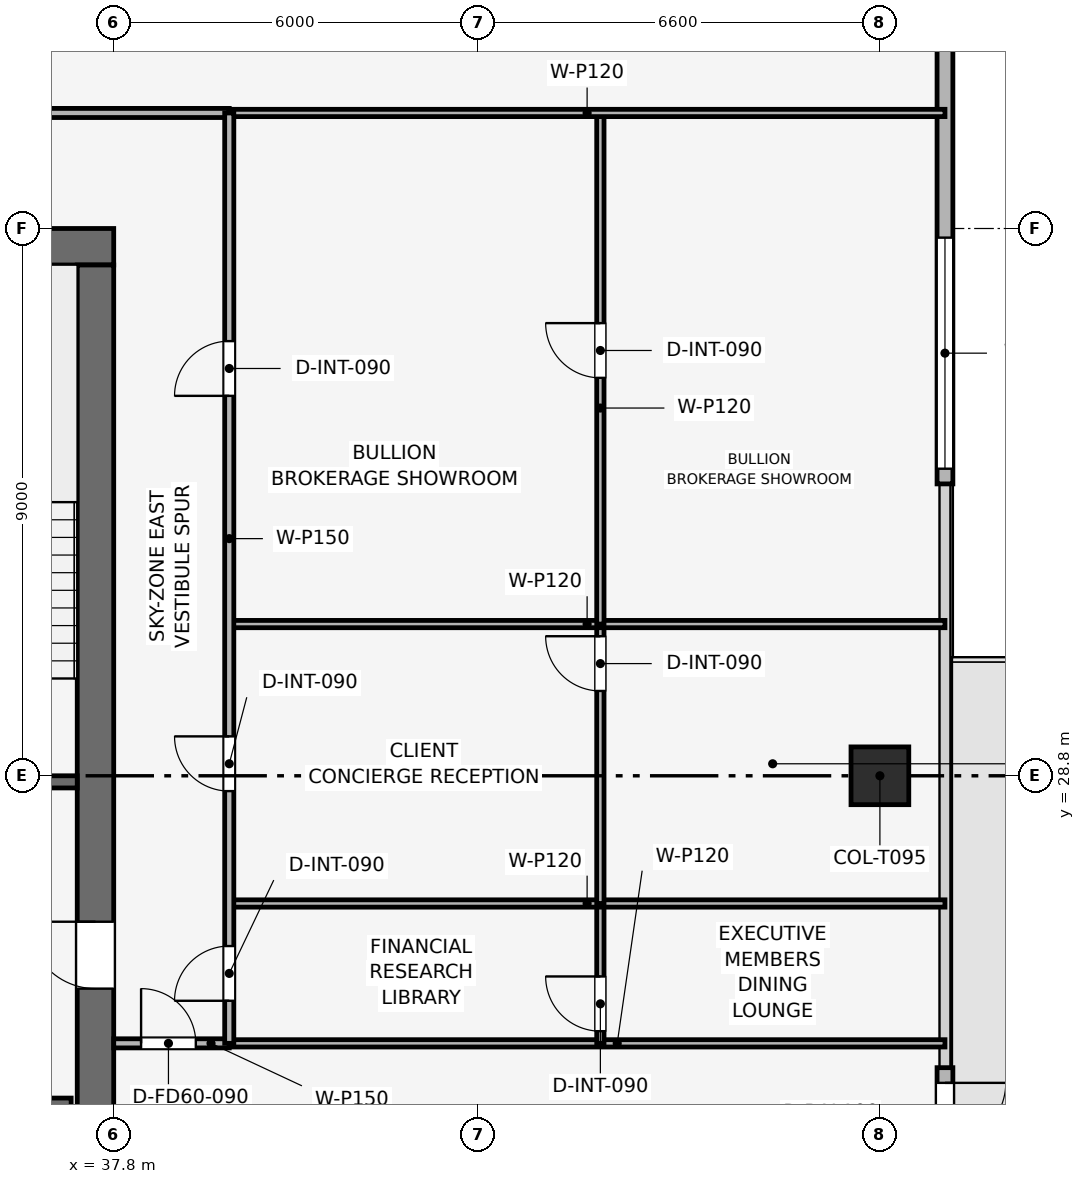
"""IFC4 building model, lengths in metres.
Left out: names, types, materials, properties, quantities, classifications, styles, units other than length and angle.
Written with IfcOpenShell. Run it as: python <this file> out.ifc"""

import sys

from ifc_helpers import new_model, si_unit, direction, frame, frame_2d, origin, origin_2d, place, context, subcontext, project, spatial, rectangle, extrude, element, fill, save


model = new_model("IFC4")
c1 = context("Model", 3, precision=1e-05, world=origin(), true_north=direction((0.0, 1.0)))
c2 = subcontext(c1, "Body", "Model", "MODEL_VIEW")
j1 = project(units=[si_unit("LENGTHUNIT", "METRE"), si_unit("PLANEANGLEUNIT", "RADIAN")], contexts=[c1])
p1 = place(None, origin())
s1 = spatial("IfcSite", under=j1, at=p1, CompositionType="ELEMENT")
p2 = place(p1, origin())
s2 = spatial("IfcBuilding", under=s1, at=p2, CompositionType="ELEMENT")
p3 = place(p2, frame((0.0, 0.0, 303.0)))
s3 = spatial("IfcBuildingStorey", under=s2, at=p3, CompositionType="ELEMENT", Elevation=303.0)
p4 = place(p3, frame((19.8, 37.5, 0.0), z_axis=(0.0, 0.0, 1.0), x_axis=(1.0, 0.0, 0.0)))
e1 = element("IfcWall", 1, at=p4, inside=s3, PredefinedType="SHEAR", context=c2, shape_type="SweptSolid", body=[
    extrude(rectangle(XDim=18.0, YDim=0.6, at=frame_2d((9.0, 0.0))), origin(), (0.0, 0.0, 1.0), 3.75),
])
p5 = place(p4, frame((7.05, 0.0, 0.0)))
e2 = element("IfcOpeningElement", 2, at=p5, cuts=e1, PredefinedType="OPENING", context=c2, shape_type="SweptSolid", body=[
    extrude(rectangle(XDim=1.1, YDim=2.15, at=frame_2d((0.55, 1.075))), frame((0.0, 0.31, 0.0), z_axis=(0.0, -1.0, 0.0), x_axis=(1.0, 0.0, 0.0)), (0.0, 0.0, 1.0), 0.62),
])
p6 = place(p3, frame((37.5, 20.4, 0.0), z_axis=(0.0, 0.0, 1.0), x_axis=(0.0, 1.0, 0.0)))
e3 = element("IfcWall", 3, at=p6, inside=s3, PredefinedType="SHEAR", context=c2, shape_type="SweptSolid", body=[
    extrude(rectangle(XDim=16.8, YDim=0.6, at=frame_2d((8.4, 0.0))), origin(), (0.0, 0.0, 1.0), 3.75),
])
p7 = place(p6, frame((4.9, 0.0, 0.0)))
e4 = element("IfcOpeningElement", 4, at=p7, cuts=e3, PredefinedType="OPENING", context=c2, shape_type="SweptSolid", body=[
    extrude(rectangle(XDim=1.1, YDim=2.15, at=frame_2d((0.55, 1.075))), frame((0.0, 0.31, 0.0), z_axis=(0.0, -1.0, 0.0), x_axis=(1.0, 0.0, 0.0)), (0.0, 0.0, 1.0), 0.62),
])
p8 = place(p3, frame((50.4, 28.8, 0.003), z_axis=(0.0, 0.0, 1.0), x_axis=(1.0, 0.0, 0.0)))
e5 = element("IfcColumn", 5, at=p8, inside=s3, PredefinedType="COLUMN", context=c2, shape_type="SweptSolid", body=[
    extrude(rectangle(XDim=0.95, YDim=0.95, at=origin_2d()), origin(), (0.0, 0.0, 1.0), 3.504),
])
p9 = place(p3, frame((51.47, 45.3, 0.0), z_axis=(0.0, 0.0, 1.0), x_axis=(0.0, -1.0, 0.0)))
e6 = element("IfcWall", 6, at=p9, inside=s3, PredefinedType="SOLIDWALL", context=c2, shape_type="SweptSolid", body=[
    extrude(rectangle(XDim=11.7, YDim=0.26, at=frame_2d((5.85, 0.0))), origin(), (0.0, 0.0, 1.0), 3.51),
])
p10 = place(p9, frame((7.65, 0.0, 0.9)))
e7 = element("IfcOpeningElement", 7, at=p10, cuts=e6, PredefinedType="OPENING", context=c2, shape_type="SweptSolid", body=[
    extrude(rectangle(XDim=3.8, YDim=1.9, at=frame_2d((1.9, 0.95))), frame((0.0, 0.14, 0.0), z_axis=(0.0, -1.0, 0.0), x_axis=(1.0, 0.0, 0.0)), (0.0, 0.0, 1.0), 0.28),
])
p11 = place(p3, frame((51.47, 24.0, 0.0), z_axis=(0.0, 0.0, 1.0), x_axis=(0.0, -1.0, 0.0)))
e8 = element("IfcWall", 8, at=p11, inside=s3, PredefinedType="SOLIDWALL", context=c2, shape_type="SweptSolid", body=[
    extrude(rectangle(XDim=11.7, YDim=0.26, at=frame_2d((5.85, 0.0))), origin(), (0.0, 0.0, 1.0), 3.51),
])
p12 = place(p11, frame((0.25, 0.0, 0.0)))
e9 = element("IfcOpeningElement", 9, at=p12, cuts=e8, PredefinedType="OPENING", context=c2, shape_type="SweptSolid", body=[
    extrude(rectangle(XDim=1.0, YDim=2.2, at=frame_2d((0.5, 1.1))), frame((0.0, 0.14, 0.0), z_axis=(0.0, -1.0, 0.0), x_axis=(1.0, 0.0, 0.0)), (0.0, 0.0, 1.0), 0.28),
])
p13 = place(p3, frame((34.05, 28.7, 0.0), z_axis=(0.0, 0.0, 1.0), x_axis=(1.0, 0.0, 0.0)))
e10 = element("IfcWall", 10, at=p13, inside=s3, PredefinedType="SHEAR", context=c2, shape_type="SweptSolid", body=[
    extrude(rectangle(XDim=3.15, YDim=0.2, at=frame_2d((1.575, 0.0))), origin(), (0.0, 0.0, 1.0), 3.51),
])
p14 = place(p13, frame((0.8, 0.0, 0.0)))
e11 = element("IfcOpeningElement", 11, at=p14, cuts=e10, PredefinedType="OPENING", context=c2, shape_type="SweptSolid", body=[
    extrude(rectangle(XDim=1.0, YDim=2.1, at=frame_2d((0.5, 1.05))), frame((0.0, 0.11, 0.0), z_axis=(0.0, -1.0, 0.0), x_axis=(1.0, 0.0, 0.0)), (0.0, 0.0, 1.0), 0.22),
])
p15 = place(p3, frame((34.05, 23.4, 0.0), z_axis=(0.0, 0.0, 1.0), x_axis=(1.0, 0.0, 0.0)))
e12 = element("IfcWall", 12, at=p15, inside=s3, PredefinedType="SHEAR", context=c2, shape_type="SweptSolid", body=[
    extrude(rectangle(XDim=3.05, YDim=0.2, at=frame_2d((1.525, 0.0))), origin(), (0.0, 0.0, 1.0), 3.51),
])
p16 = place(p15, frame((1.2, 0.0, 0.0)))
e13 = element("IfcOpeningElement", 13, at=p16, cuts=e12, PredefinedType="OPENING", context=c2, shape_type="SweptSolid", body=[
    extrude(rectangle(XDim=1.1, YDim=2.15, at=frame_2d((0.55, 1.075))), frame((0.0, 0.11, 0.0), z_axis=(0.0, -1.0, 0.0), x_axis=(1.0, 0.0, 0.0)), (0.0, 0.0, 1.0), 0.22),
])
p17 = place(p3, frame((37.8, 24.4, 0.0), z_axis=(0.0, 0.0, 1.0), x_axis=(1.0, 0.0, 0.0)))
e14 = element("IfcWall", 14, at=p17, inside=s3, PredefinedType="PARTITIONING", context=c2, shape_type="SweptSolid", body=[
    extrude(rectangle(XDim=1.9, YDim=0.15, at=frame_2d((0.95, 0.0))), origin(), (0.0, 0.0, 1.0), 3.51),
])
p18 = place(p17, frame((0.45, 0.0, 0.0)))
e15 = element("IfcOpeningElement", 15, at=p18, cuts=e14, PredefinedType="OPENING", context=c2, shape_type="SweptSolid", body=[
    extrude(rectangle(XDim=0.9, YDim=2.1, at=frame_2d((0.45, 1.05))), frame((0.0, 0.085, 0.0), z_axis=(0.0, -1.0, 0.0), x_axis=(1.0, 0.0, 0.0)), (0.0, 0.0, 1.0), 0.17),
])
p19 = place(p3, frame((39.7, 24.4, 0.0), z_axis=(0.0, 0.0, 1.0), x_axis=(1.0, 0.0, 0.0)))
e16 = element("IfcWall", 16, at=p19, inside=s3, PredefinedType="PARTITIONING", context=c2, shape_type="SweptSolid", body=[
    extrude(rectangle(XDim=11.77, YDim=0.12, at=frame_2d((5.885, 0.0))), origin(), (0.0, 0.0, 1.0), 3.135),
])
p20 = place(p3, frame((45.803, 24.4, 0.0), z_axis=(0.0, 0.0, 1.0), x_axis=(0.0, 1.0, 0.0)))
e17 = element("IfcWall", 17, at=p20, inside=s3, PredefinedType="PARTITIONING", context=c2, shape_type="SweptSolid", body=[
    extrude(rectangle(XDim=2.3, YDim=0.12, at=frame_2d((1.15, 0.0))), origin(), (0.0, 0.0, 1.0), 3.51),
])
p21 = place(p20, frame((0.2, 0.0, 0.0)))
e18 = element("IfcOpeningElement", 18, at=p21, cuts=e17, PredefinedType="OPENING", context=c2, shape_type="SweptSolid", body=[
    extrude(rectangle(XDim=0.9, YDim=2.1, at=frame_2d((0.45, 1.05))), frame((0.0, 0.07, 0.0), z_axis=(0.0, -1.0, 0.0), x_axis=(1.0, 0.0, 0.0)), (0.0, 0.0, 1.0), 0.14),
])
p22 = place(p3, frame((39.7, 26.7, 0.0), z_axis=(0.0, 0.0, 1.0), x_axis=(1.0, 0.0, 0.0)))
e19 = element("IfcWall", 19, at=p22, inside=s3, PredefinedType="PARTITIONING", context=c2, shape_type="SweptSolid", body=[
    extrude(rectangle(XDim=11.77, YDim=0.12, at=frame_2d((5.885, 0.0))), origin(), (0.0, 0.0, 1.0), 3.135),
])
p23 = place(p3, frame((45.803, 26.7, 0.0), z_axis=(0.0, 0.0, 1.0), x_axis=(0.0, 1.0, 0.0)))
e20 = element("IfcWall", 20, at=p23, inside=s3, PredefinedType="PARTITIONING", context=c2, shape_type="SweptSolid", body=[
    extrude(rectangle(XDim=4.595, YDim=0.12, at=frame_2d((2.297, 0.0))), origin(), (0.0, 0.0, 1.0), 3.095),
])
p24 = place(p23, frame((3.495, 0.0, 0.0)))
e21 = element("IfcOpeningElement", 21, at=p24, cuts=e20, PredefinedType="OPENING", context=c2, shape_type="SweptSolid", body=[
    extrude(rectangle(XDim=0.9, YDim=2.1, at=frame_2d((0.45, 1.05))), frame((0.0, 0.07, 0.0), z_axis=(0.0, -1.0, 0.0), x_axis=(1.0, 0.0, 0.0)), (0.0, 0.0, 1.0), 0.14),
])
p25 = place(p3, frame((39.7, 31.295, 0.0), z_axis=(0.0, 0.0, 1.0), x_axis=(1.0, 0.0, 0.0)))
e22 = element("IfcWall", 22, at=p25, inside=s3, PredefinedType="PARTITIONING", context=c2, shape_type="SweptSolid", body=[
    extrude(rectangle(XDim=11.77, YDim=0.12, at=frame_2d((5.885, 0.0))), origin(), (0.0, 0.0, 1.0), 3.135),
])
p26 = place(p3, frame((45.803, 31.295, 0.0), z_axis=(0.0, 0.0, 1.0), x_axis=(0.0, 1.0, 0.0)))
e23 = element("IfcWall", 23, at=p26, inside=s3, PredefinedType="PARTITIONING", context=c2, shape_type="SweptSolid", body=[
    extrude(rectangle(XDim=8.405, YDim=0.12, at=frame_2d((4.203, 0.0))), origin(), (0.0, 0.0, 1.0), 3.095),
])
p27 = place(p26, frame((4.049, 0.0, 0.0)))
e24 = element("IfcOpeningElement", 24, at=p27, cuts=e23, PredefinedType="OPENING", context=c2, shape_type="SweptSolid", body=[
    extrude(rectangle(XDim=0.9, YDim=2.1, at=frame_2d((0.45, 1.05))), frame((0.0, 0.07, 0.0), z_axis=(0.0, -1.0, 0.0), x_axis=(1.0, 0.0, 0.0)), (0.0, 0.0, 1.0), 0.14),
])
p28 = place(p3, frame((39.7, 39.7, 0.0), z_axis=(0.0, 0.0, 1.0), x_axis=(1.0, 0.0, 0.0)))
e25 = element("IfcWall", 25, at=p28, inside=s3, PredefinedType="PARTITIONING", context=c2, shape_type="SweptSolid", body=[
    extrude(rectangle(XDim=11.77, YDim=0.12, at=frame_2d((5.885, 0.0))), origin(), (0.0, 0.0, 1.0), 3.095),
])
p29 = place(p3, frame((17.9, 39.7, 0.0), z_axis=(0.0, 0.0, 1.0), x_axis=(1.0, 0.0, 0.0)))
e26 = element("IfcWall", 26, at=p29, inside=s3, PredefinedType="PARTITIONING", context=c2, shape_type="SweptSolid", body=[
    extrude(rectangle(XDim=21.8, YDim=0.15, at=frame_2d((10.9, 0.0))), origin(), (0.0, 0.0, 1.0), 3.095),
])
p30 = place(p29, frame((2.1, 0.0, 0.0)))
e27 = element("IfcOpeningElement", 27, at=p30, cuts=e26, PredefinedType="OPENING", context=c2, shape_type="SweptSolid", body=[
    extrude(rectangle(XDim=0.9, YDim=2.1, at=frame_2d((0.45, 1.05))), frame((0.0, 0.085, 0.0), z_axis=(0.0, -1.0, 0.0), x_axis=(1.0, 0.0, 0.0)), (0.0, 0.0, 1.0), 0.17),
])
p31 = place(p29, frame((6.05, 0.0, 0.0)))
e28 = element("IfcOpeningElement", 28, at=p31, cuts=e26, PredefinedType="OPENING", context=c2, shape_type="SweptSolid", body=[
    extrude(rectangle(XDim=0.9, YDim=2.1, at=frame_2d((0.45, 1.05))), frame((0.0, 0.085, 0.0), z_axis=(0.0, -1.0, 0.0), x_axis=(1.0, 0.0, 0.0)), (0.0, 0.0, 1.0), 0.17),
])
p32 = place(p29, frame((8.95, 0.0, 0.0)))
e29 = element("IfcOpeningElement", 29, at=p32, cuts=e26, PredefinedType="OPENING", context=c2, shape_type="SweptSolid", body=[
    extrude(rectangle(XDim=0.9, YDim=2.1, at=frame_2d((0.45, 1.05))), frame((0.0, 0.085, 0.0), z_axis=(0.0, -1.0, 0.0), x_axis=(1.0, 0.0, 0.0)), (0.0, 0.0, 1.0), 0.17),
])
p33 = place(p29, frame((11.7, 0.0, 0.0)))
e30 = element("IfcOpeningElement", 30, at=p33, cuts=e26, PredefinedType="OPENING", context=c2, shape_type="SweptSolid", body=[
    extrude(rectangle(XDim=0.95, YDim=2.1, at=frame_2d((0.475, 1.05))), frame((0.0, 0.085, 0.0), z_axis=(0.0, -1.0, 0.0), x_axis=(1.0, 0.0, 0.0)), (0.0, 0.0, 1.0), 0.17),
])
p34 = place(p29, frame((17.2, 0.0, 0.0)))
e31 = element("IfcOpeningElement", 31, at=p34, cuts=e26, PredefinedType="OPENING", context=c2, shape_type="SweptSolid", body=[
    extrude(rectangle(XDim=0.9, YDim=2.1, at=frame_2d((0.45, 1.05))), frame((0.0, 0.085, 0.0), z_axis=(0.0, -1.0, 0.0), x_axis=(1.0, 0.0, 0.0)), (0.0, 0.0, 1.0), 0.17),
])
p35 = place(p3, frame((39.7, 24.4, 0.0), z_axis=(0.0, 0.0, 1.0), x_axis=(0.0, 1.0, 0.0)))
e32 = element("IfcWall", 32, at=p35, inside=s3, PredefinedType="PARTITIONING", context=c2, shape_type="SweptSolid", body=[
    extrude(rectangle(XDim=15.3, YDim=0.15, at=frame_2d((7.65, 0.0))), origin(), (0.0, 0.0, 1.0), 3.095),
])
p36 = place(p35, frame((0.7, 0.0, 0.0)))
e33 = element("IfcOpeningElement", 33, at=p36, cuts=e32, PredefinedType="OPENING", context=c2, shape_type="SweptSolid", body=[
    extrude(rectangle(XDim=0.9, YDim=2.1, at=frame_2d((0.45, 1.05))), frame((0.0, 0.085, 0.0), z_axis=(0.0, -1.0, 0.0), x_axis=(1.0, 0.0, 0.0)), (0.0, 0.0, 1.0), 0.17),
])
p37 = place(p35, frame((4.148, 0.0, 0.0)))
e34 = element("IfcOpeningElement", 34, at=p37, cuts=e32, PredefinedType="OPENING", context=c2, shape_type="SweptSolid", body=[
    extrude(rectangle(XDim=0.9, YDim=2.1, at=frame_2d((0.45, 1.05))), frame((0.0, 0.085, 0.0), z_axis=(0.0, -1.0, 0.0), x_axis=(1.0, 0.0, 0.0)), (0.0, 0.0, 1.0), 0.17),
])
p38 = place(p35, frame((10.648, 0.0, 0.0)))
e35 = element("IfcOpeningElement", 35, at=p38, cuts=e32, PredefinedType="OPENING", context=c2, shape_type="SweptSolid", body=[
    extrude(rectangle(XDim=0.9, YDim=2.1, at=frame_2d((0.45, 1.05))), frame((0.0, 0.085, 0.0), z_axis=(0.0, -1.0, 0.0), x_axis=(1.0, 0.0, 0.0)), (0.0, 0.0, 1.0), 0.17),
])
p39 = place(p12, origin())
e36 = element("IfcDoor", 36, at=p39, inside=s3, OperationType="SINGLE_SWING_LEFT", PredefinedType="DOOR", context=c2, shape_type="SweptSolid", body=[
    extrude(rectangle(XDim=1.0, YDim=2.2, at=frame_2d((0.5, 1.1))), frame((0.0, 0.025, 0.0), z_axis=(0.0, -1.0, 0.0), x_axis=(1.0, 0.0, 0.0)), (0.0, 0.0, 1.0), 0.05),
])
fill(e9, e36)
p40 = place(p10, origin())
e37 = element("IfcWindow", 37, at=p40, inside=s3, PartitioningType="SINGLE_PANEL", PredefinedType="WINDOW", context=c2, shape_type="SweptSolid", body=[
    extrude(rectangle(XDim=3.8, YDim=1.9, at=frame_2d((1.9, 0.95))), frame((0.0, 0.03, 0.0), z_axis=(0.0, -1.0, 0.0), x_axis=(1.0, 0.0, 0.0)), (0.0, 0.0, 1.0), 0.06),
])
fill(e7, e37)
p41 = place(p18, origin())
e38 = element("IfcDoor", 38, at=p41, inside=s3, OperationType="SINGLE_SWING_LEFT", PredefinedType="DOOR", context=c2, shape_type="SweptSolid", body=[
    extrude(rectangle(XDim=0.9, YDim=2.1, at=frame_2d((0.45, 1.05))), frame((0.0, 0.025, 0.0), z_axis=(0.0, -1.0, 0.0), x_axis=(1.0, 0.0, 0.0)), (0.0, 0.0, 1.0), 0.05),
])
fill(e15, e38)
p42 = place(p21, origin())
e39 = element("IfcDoor", 39, at=p42, inside=s3, OperationType="SINGLE_SWING_RIGHT", PredefinedType="DOOR", context=c2, shape_type="SweptSolid", body=[
    extrude(rectangle(XDim=0.9, YDim=2.1, at=frame_2d((0.45, 1.05))), frame((0.0, 0.025, 0.0), z_axis=(0.0, -1.0, 0.0), x_axis=(1.0, 0.0, 0.0)), (0.0, 0.0, 1.0), 0.05),
])
fill(e18, e39)
p43 = place(p24, origin())
e40 = element("IfcDoor", 40, at=p43, inside=s3, OperationType="SINGLE_SWING_RIGHT", PredefinedType="DOOR", context=c2, shape_type="SweptSolid", body=[
    extrude(rectangle(XDim=0.9, YDim=2.1, at=frame_2d((0.45, 1.05))), frame((0.0, 0.025, 0.0), z_axis=(0.0, -1.0, 0.0), x_axis=(1.0, 0.0, 0.0)), (0.0, 0.0, 1.0), 0.05),
])
fill(e21, e40)
p44 = place(p27, origin())
e41 = element("IfcDoor", 41, at=p44, inside=s3, OperationType="SINGLE_SWING_RIGHT", PredefinedType="DOOR", context=c2, shape_type="SweptSolid", body=[
    extrude(rectangle(XDim=0.9, YDim=2.1, at=frame_2d((0.45, 1.05))), frame((0.0, 0.025, 0.0), z_axis=(0.0, -1.0, 0.0), x_axis=(1.0, 0.0, 0.0)), (0.0, 0.0, 1.0), 0.05),
])
fill(e24, e41)
p45 = place(p36, origin())
e42 = element("IfcDoor", 42, at=p45, inside=s3, OperationType="SINGLE_SWING_LEFT", PredefinedType="DOOR", context=c2, shape_type="SweptSolid", body=[
    extrude(rectangle(XDim=0.9, YDim=2.1, at=frame_2d((0.45, 1.05))), frame((0.0, 0.025, 0.0), z_axis=(0.0, -1.0, 0.0), x_axis=(1.0, 0.0, 0.0)), (0.0, 0.0, 1.0), 0.05),
])
fill(e33, e42)
p46 = place(p37, origin())
e43 = element("IfcDoor", 43, at=p46, inside=s3, OperationType="SINGLE_SWING_RIGHT", PredefinedType="DOOR", context=c2, shape_type="SweptSolid", body=[
    extrude(rectangle(XDim=0.9, YDim=2.1, at=frame_2d((0.45, 1.05))), frame((0.0, 0.025, 0.0), z_axis=(0.0, -1.0, 0.0), x_axis=(1.0, 0.0, 0.0)), (0.0, 0.0, 1.0), 0.05),
])
fill(e34, e43)
p47 = place(p38, origin())
e44 = element("IfcDoor", 44, at=p47, inside=s3, OperationType="SINGLE_SWING_LEFT", PredefinedType="DOOR", context=c2, shape_type="SweptSolid", body=[
    extrude(rectangle(XDim=0.9, YDim=2.1, at=frame_2d((0.45, 1.05))), frame((0.0, 0.025, 0.0), z_axis=(0.0, -1.0, 0.0), x_axis=(1.0, 0.0, 0.0)), (0.0, 0.0, 1.0), 0.05),
])
fill(e35, e44)
p48 = place(p7, origin())
e45 = element("IfcDoor", 45, at=p48, inside=s3, OperationType="SINGLE_SWING_RIGHT", PredefinedType="DOOR", context=c2, shape_type="SweptSolid", body=[
    extrude(rectangle(XDim=1.1, YDim=2.15, at=frame_2d((0.55, 1.075))), frame((0.0, 0.025, 0.0), z_axis=(0.0, -1.0, 0.0), x_axis=(1.0, 0.0, 0.0)), (0.0, 0.0, 1.0), 0.05),
])
fill(e4, e45)
save(model, sys.argv[1])
